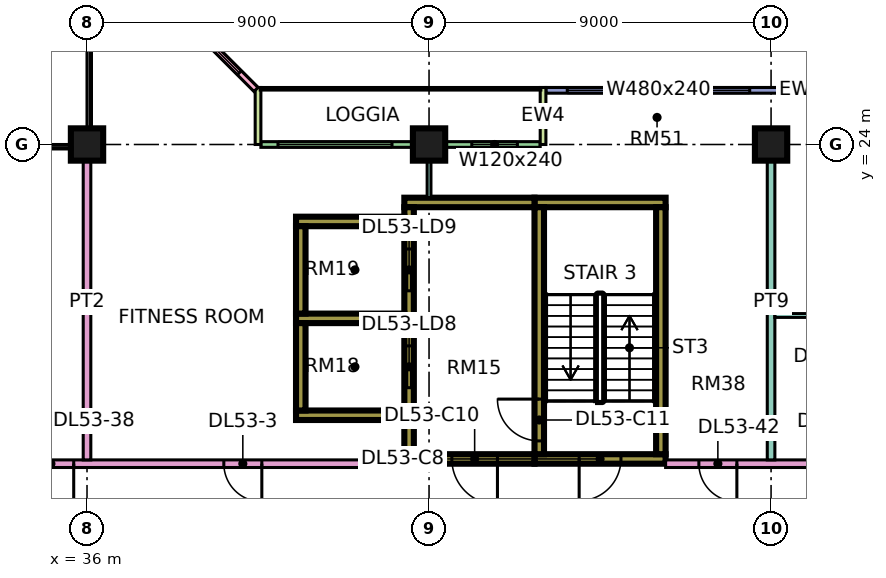
"""IFC4 building model, lengths in metres.
Left out: names, types, materials, properties, quantities, classifications, styles, units other than length and angle.
Written with IfcOpenShell. Run it as: python <this file> out.ifc"""

import sys

from ifc_helpers import new_model, si_unit, direction, frame, frame_2d, origin, origin_2d, place, context, subcontext, project, spatial, rectangle, extrude, element, fill, save


model = new_model("IFC4")
c1 = context("Model", 3, precision=1e-05, world=origin(), true_north=direction((0.0, 1.0)))
c2 = subcontext(c1, "Body", "Model", "MODEL_VIEW")
j1 = project(units=[si_unit("LENGTHUNIT", "METRE"), si_unit("PLANEANGLEUNIT", "RADIAN")], contexts=[c1])
p1 = place(None, origin())
s1 = spatial("IfcSite", under=j1, at=p1, CompositionType="ELEMENT")
p2 = place(p1, origin())
s2 = spatial("IfcBuilding", under=s1, at=p2, CompositionType="ELEMENT")
p3 = place(p2, frame((0.0, 0.0, 226.65)))
s3 = spatial("IfcBuildingStorey", under=s2, at=p3, CompositionType="ELEMENT", Elevation=226.65)
for number, where, z_axis, x_axis in (
    (1, (36.0, 24.0, 0.0), (0.0, 0.0, 1.0), (1.0, 0.0, 0.0)),
    (2, (45.0, 24.0, 0.0), (0.0, 0.0, 1.0), (1.0, 0.0, 0.0)),
    (3, (54.0, 24.0, 0.0), (0.0, 0.0, 1.0), (1.0, 0.0, 0.0)),
):
    element("IfcColumn", number, at=place(p3, frame(where, z_axis=z_axis, x_axis=x_axis)), inside=s3, PredefinedType="COLUMN", context=c2, shape_type="SweptSolid", body=[
        extrude(rectangle(XDim=0.85, YDim=0.85, at=origin_2d()), origin(), (0.0, 0.0, 1.0), 3.75),
    ])
p4 = place(p3, frame((47.775, 15.725, 0.0), z_axis=(0.0, 0.0, 1.0), x_axis=(1.0, 0.0, 0.0)))
e4 = element("IfcWall", 4, at=p4, inside=s3, PredefinedType="SHEAR", context=c2, shape_type="SweptSolid", body=[
    extrude(rectangle(XDim=3.45, YDim=0.25, at=frame_2d((1.725, 0.0))), origin(), (0.0, 0.0, 1.0), 3.75),
])
p5 = place(p4, frame((1.175, 0.0, 0.0)))
e5 = element("IfcOpeningElement", 5, at=p5, cuts=e4, PredefinedType="OPENING", context=c2, shape_type="SweptSolid", body=[
    extrude(rectangle(XDim=1.1, YDim=2.2, at=frame_2d((0.55, 1.1))), frame((0.0, 0.135, 0.0), z_axis=(0.0, -1.0, 0.0), x_axis=(1.0, 0.0, 0.0)), (0.0, 0.0, 1.0), 0.27),
])
p6 = place(p3, frame((47.775, 22.475, 0.0), z_axis=(0.0, 0.0, 1.0), x_axis=(1.0, 0.0, 0.0)))
e6 = element("IfcWall", 6, at=p6, inside=s3, PredefinedType="SHEAR", context=c2, shape_type="SweptSolid", body=[
    extrude(rectangle(XDim=3.45, YDim=0.25, at=frame_2d((1.725, 0.0))), origin(), (0.0, 0.0, 1.0), 3.75),
])
p7 = place(p3, frame((47.9, 15.85, 0.0), z_axis=(0.0, 0.0, 1.0), x_axis=(0.0, 1.0, 0.0)))
e7 = element("IfcWall", 7, at=p7, inside=s3, PredefinedType="SHEAR", context=c2, shape_type="SweptSolid", body=[
    extrude(rectangle(XDim=6.5, YDim=0.25, at=frame_2d((3.25, 0.0))), origin(), (0.0, 0.0, 1.0), 3.75),
])
p8 = place(p7, frame((0.35, 0.0, 0.0)))
e8 = element("IfcOpeningElement", 8, at=p8, cuts=e7, PredefinedType="OPENING", context=c2, shape_type="SweptSolid", body=[
    extrude(rectangle(XDim=1.1, YDim=2.2, at=frame_2d((0.55, 1.1))), frame((0.0, 0.135, 0.0), z_axis=(0.0, -1.0, 0.0), x_axis=(1.0, 0.0, 0.0)), (0.0, 0.0, 1.0), 0.27),
])
p9 = place(p3, frame((51.1, 15.85, 0.0), z_axis=(0.0, 0.0, 1.0), x_axis=(0.0, 1.0, 0.0)))
e9 = element("IfcWall", 9, at=p9, inside=s3, PredefinedType="SHEAR", context=c2, shape_type="SweptSolid", body=[
    extrude(rectangle(XDim=6.5, YDim=0.25, at=frame_2d((3.25, 0.0))), origin(), (0.0, 0.0, 1.0), 3.75),
])
p10 = place(p3, frame((44.35, 15.725, 0.0), z_axis=(0.0, 0.0, 1.0), x_axis=(1.0, 0.0, 0.0)))
e10 = element("IfcWall", 10, at=p10, inside=s3, PredefinedType="SHEAR", context=c2, shape_type="SweptSolid", body=[
    extrude(rectangle(XDim=3.425, YDim=0.25, at=frame_2d((1.712, 0.0))), origin(), (0.0, 0.0, 1.0), 3.75),
])
p11 = place(p10, frame((1.25, 0.0, 0.0)))
e11 = element("IfcOpeningElement", 11, at=p11, cuts=e10, PredefinedType="OPENING", context=c2, shape_type="SweptSolid", body=[
    extrude(rectangle(XDim=1.2, YDim=2.2, at=frame_2d((0.6, 1.1))), frame((0.0, 0.135, 0.0), z_axis=(0.0, -1.0, 0.0), x_axis=(1.0, 0.0, 0.0)), (0.0, 0.0, 1.0), 0.27),
])
p12 = place(p3, frame((44.35, 22.475, 0.0), z_axis=(0.0, 0.0, 1.0), x_axis=(1.0, 0.0, 0.0)))
e12 = element("IfcWall", 12, at=p12, inside=s3, PredefinedType="SHEAR", context=c2, shape_type="SweptSolid", body=[
    extrude(rectangle(XDim=3.425, YDim=0.25, at=frame_2d((1.712, 0.0))), origin(), (0.0, 0.0, 1.0), 3.75),
])
p13 = place(p3, frame((44.475, 15.85, 0.0), z_axis=(0.0, 0.0, 1.0), x_axis=(0.0, 1.0, 0.0)))
e13 = element("IfcWall", 13, at=p13, inside=s3, PredefinedType="SHEAR", context=c2, shape_type="SweptSolid", body=[
    extrude(rectangle(XDim=6.5, YDim=0.25, at=frame_2d((3.25, 0.0))), origin(), (0.0, 0.0, 1.0), 3.75),
])
p14 = place(p13, frame((1.75, 0.0, 0.0)))
e14 = element("IfcOpeningElement", 14, at=p14, cuts=e13, PredefinedType="OPENING", context=c2, shape_type="SweptSolid", body=[
    extrude(rectangle(XDim=1.1, YDim=2.2, at=frame_2d((0.55, 1.1))), frame((0.0, 0.135, 0.0), z_axis=(0.0, -1.0, 0.0), x_axis=(1.0, 0.0, 0.0)), (0.0, 0.0, 1.0), 0.27),
])
p15 = place(p13, frame((4.3, 0.0, 0.0)))
e15 = element("IfcOpeningElement", 15, at=p15, cuts=e13, PredefinedType="OPENING", context=c2, shape_type="SweptSolid", body=[
    extrude(rectangle(XDim=1.1, YDim=2.2, at=frame_2d((0.55, 1.1))), frame((0.0, 0.135, 0.0), z_axis=(0.0, -1.0, 0.0), x_axis=(1.0, 0.0, 0.0)), (0.0, 0.0, 1.0), 0.27),
])
for number, where, z_axis, x_axis in (
    (16, (41.5, 16.875, 0.0), (0.0, 0.0, 1.0), (1.0, 0.0, 0.0)),
    (17, (41.5, 19.425, 0.0), (0.0, 0.0, 1.0), (1.0, 0.0, 0.0)),
    (18, (41.5, 21.975, 0.0), (0.0, 0.0, 1.0), (1.0, 0.0, 0.0)),
):
    element("IfcWall", number, at=place(p3, frame(where, z_axis=z_axis, x_axis=x_axis)), inside=s3, PredefinedType="SHEAR", context=c2, shape_type="SweptSolid", body=[
        extrude(rectangle(XDim=2.85, YDim=0.25, at=frame_2d((1.425, 0.0))), origin(), (0.0, 0.0, 1.0), 3.75),
    ])
for number, where, z_axis, x_axis in (
    (19, (41.625, 17.0, 0.0), (0.0, 0.0, 1.0), (0.0, 1.0, 0.0)),
    (20, (41.625, 19.55, 0.0), (0.0, 0.0, 1.0), (0.0, 1.0, 0.0)),
):
    element("IfcWall", number, at=place(p3, frame(where, z_axis=z_axis, x_axis=x_axis)), inside=s3, PredefinedType="SHEAR", context=c2, shape_type="SweptSolid", body=[
        extrude(rectangle(XDim=2.3, YDim=0.25, at=frame_2d((1.15, 0.0))), origin(), (0.0, 0.0, 1.0), 3.75),
    ])
p16 = place(p3, frame((61.5, 25.425, 0.0), z_axis=(0.0, 0.0, 1.0), x_axis=(-1.0, 0.0, 0.0)))
e21 = element("IfcWall", 21, at=p16, inside=s3, PredefinedType="SOLIDWALL", context=c2, shape_type="SweptSolid", body=[
    extrude(rectangle(XDim=13.425, YDim=0.15, at=frame_2d((6.712, 0.0))), origin(), (0.0, 0.0, 1.0), 3.35),
])
p17 = place(p16, frame((2.1, 0.0, 0.45)))
e22 = element("IfcOpeningElement", 22, at=p17, cuts=e21, PredefinedType="OPENING", context=c2, shape_type="SweptSolid", body=[
    extrude(rectangle(XDim=1.8, YDim=2.4, at=frame_2d((0.9, 1.2))), frame((0.0, 0.085, 0.0), z_axis=(0.0, -1.0, 0.0), x_axis=(1.0, 0.0, 0.0)), (0.0, 0.0, 1.0), 0.17),
])
p18 = place(p16, frame((5.1, 0.0, 0.45)))
e23 = element("IfcOpeningElement", 23, at=p18, cuts=e21, PredefinedType="OPENING", context=c2, shape_type="SweptSolid", body=[
    extrude(rectangle(XDim=1.8, YDim=2.4, at=frame_2d((0.9, 1.2))), frame((0.0, 0.085, 0.0), z_axis=(0.0, -1.0, 0.0), x_axis=(1.0, 0.0, 0.0)), (0.0, 0.0, 1.0), 0.17),
])
p19 = place(p16, frame((8.062, 0.0, 0.45)))
e24 = element("IfcOpeningElement", 24, at=p19, cuts=e21, PredefinedType="OPENING", context=c2, shape_type="SweptSolid", body=[
    extrude(rectangle(XDim=4.8, YDim=2.4, at=frame_2d((2.4, 1.2))), frame((0.0, 0.085, 0.0), z_axis=(0.0, -1.0, 0.0), x_axis=(1.0, 0.0, 0.0)), (0.0, 0.0, 1.0), 0.17),
])
p20 = place(p3, frame((47.925, 24.0, 0.0), z_axis=(0.0, 0.0, 1.0), x_axis=(-1.0, 0.0, 0.0)))
e25 = element("IfcWall", 25, at=p20, inside=s3, PredefinedType="SOLIDWALL", context=c2, shape_type="SweptSolid", body=[
    extrude(rectangle(XDim=7.35, YDim=0.15, at=frame_2d((3.675, 0.0))), origin(), (0.0, 0.0, 1.0), 3.35),
])
p21 = place(p20, frame((0.6, 0.0, 0.45)))
e26 = element("IfcOpeningElement", 26, at=p21, cuts=e25, PredefinedType="OPENING", context=c2, shape_type="SweptSolid", body=[
    extrude(rectangle(XDim=1.2, YDim=2.4, at=frame_2d((0.6, 1.2))), frame((0.0, 0.085, 0.0), z_axis=(0.0, -1.0, 0.0), x_axis=(1.0, 0.0, 0.0)), (0.0, 0.0, 1.0), 0.17),
])
p22 = place(p20, frame((3.9, 0.0, 0.45)))
e27 = element("IfcOpeningElement", 27, at=p22, cuts=e25, PredefinedType="OPENING", context=c2, shape_type="SweptSolid", body=[
    extrude(rectangle(XDim=3.0, YDim=2.4, at=frame_2d((1.5, 1.2))), frame((0.0, 0.085, 0.0), z_axis=(0.0, -1.0, 0.0), x_axis=(1.0, 0.0, 0.0)), (0.0, 0.0, 1.0), 0.17),
])
for number, where, z_axis, x_axis in (
    (28, (48.0, 25.5, 0.0), (0.0, 0.0, 1.0), (0.0, -1.0, 0.0)),
    (29, (40.5, 25.5, 0.0), (0.0, 0.0, 1.0), (0.0, -1.0, 0.0)),
):
    element("IfcWall", number, at=place(p3, frame(where, z_axis=z_axis, x_axis=x_axis)), inside=s3, PredefinedType="SOLIDWALL", context=c2, shape_type="SweptSolid", body=[
        extrude(rectangle(XDim=1.5, YDim=0.15, at=frame_2d((0.75, 0.0))), origin(), (0.0, 0.0, 1.0), 3.35),
    ])
p23 = place(p3, frame((40.447, 25.447, 0.0), z_axis=(0.0, 0.0, 1.0), x_axis=(-0.707106781187, 0.707106781187, 0.0)))
e30 = element("IfcWall", 30, at=p23, inside=s3, PredefinedType="SOLIDWALL", context=c2, shape_type="SweptSolid", body=[
    extrude(rectangle(XDim=4.243, YDim=0.15, at=frame_2d((2.121, 0.0))), origin(), (0.0, 0.0, 1.0), 3.35),
])
p24 = place(p23, frame((0.621, 0.0, 0.45)))
e31 = element("IfcOpeningElement", 31, at=p24, cuts=e30, PredefinedType="OPENING", context=c2, shape_type="SweptSolid", body=[
    extrude(rectangle(XDim=3.0, YDim=2.4, at=frame_2d((1.5, 1.2))), frame((0.0, 0.085, 0.0), z_axis=(0.0, -1.0, 0.0), x_axis=(1.0, 0.0, 0.0)), (0.0, 0.0, 1.0), 0.17),
])
p25 = place(p3, frame((34.0, 15.6, 0.0), z_axis=(0.0, 0.0, 1.0), x_axis=(1.0, 0.0, 0.0)))
e32 = element("IfcWall", 32, at=p25, inside=s3, PredefinedType="PARTITIONING", context=c2, shape_type="SweptSolid", body=[
    extrude(rectangle(XDim=10.35, YDim=0.2, at=frame_2d((5.175, 0.0))), origin(), (0.0, 0.0, 1.0), 3.35),
])
p26 = place(p25, frame((5.6, 0.0, 0.0)))
e33 = element("IfcOpeningElement", 33, at=p26, cuts=e32, PredefinedType="OPENING", context=c2, shape_type="SweptSolid", body=[
    extrude(rectangle(XDim=1.0, YDim=2.1, at=frame_2d((0.5, 1.05))), frame((0.0, 0.11, 0.0), z_axis=(0.0, -1.0, 0.0), x_axis=(1.0, 0.0, 0.0)), (0.0, 0.0, 1.0), 0.22),
])
p27 = place(p25, frame((0.45, 0.0, 0.0)))
e34 = element("IfcOpeningElement", 34, at=p27, cuts=e32, PredefinedType="OPENING", context=c2, shape_type="SweptSolid", body=[
    extrude(rectangle(XDim=1.2, YDim=2.1, at=frame_2d((0.6, 1.05))), frame((0.0, 0.11, 0.0), z_axis=(0.0, -1.0, 0.0), x_axis=(1.0, 0.0, 0.0)), (0.0, 0.0, 1.0), 0.22),
])
p28 = place(p3, frame((36.0, 15.7, 0.0), z_axis=(0.0, 0.0, 1.0), x_axis=(0.0, 1.0, 0.0)))
e35 = element("IfcWall", 35, at=p28, inside=s3, PredefinedType="PARTITIONING", context=c2, shape_type="SweptSolid", body=[
    extrude(rectangle(XDim=8.3, YDim=0.2, at=frame_2d((4.15, 0.0))), origin(), (0.0, 0.0, 1.0), 3.35),
])
p29 = place(p3, frame((45.0, 22.6, 0.0), z_axis=(0.0, 0.0, 1.0), x_axis=(0.0, 1.0, 0.0)))
e36 = element("IfcWall", 36, at=p29, inside=s3, PredefinedType="PARTITIONING", context=c2, shape_type="SweptSolid", body=[
    extrude(rectangle(XDim=1.326, YDim=0.1, at=frame_2d((0.663, 0.0))), origin(), (0.0, 0.0, 1.0), 3.35),
])
p30 = place(p3, frame((51.225, 15.6, 0.0), z_axis=(0.0, 0.0, 1.0), x_axis=(1.0, 0.0, 0.0)))
e37 = element("IfcWall", 37, at=p30, inside=s3, PredefinedType="PARTITIONING", context=c2, shape_type="SweptSolid", body=[
    extrude(rectangle(XDim=11.701, YDim=0.2, at=frame_2d((5.851, 0.0))), origin(), (0.0, 0.0, 1.0), 3.35),
])
p31 = place(p30, frame((3.875, 0.0, 0.0)))
e38 = element("IfcOpeningElement", 38, at=p31, cuts=e37, PredefinedType="OPENING", context=c2, shape_type="SweptSolid", body=[
    extrude(rectangle(XDim=1.0, YDim=2.1, at=frame_2d((0.5, 1.05))), frame((0.0, 0.11, 0.0), z_axis=(0.0, -1.0, 0.0), x_axis=(1.0, 0.0, 0.0)), (0.0, 0.0, 1.0), 0.22),
])
p32 = place(p30, frame((0.875, 0.0, 0.0)))
e39 = element("IfcOpeningElement", 39, at=p32, cuts=e37, PredefinedType="OPENING", context=c2, shape_type="SweptSolid", body=[
    extrude(rectangle(XDim=1.0, YDim=2.1, at=frame_2d((0.5, 1.05))), frame((0.0, 0.11, 0.0), z_axis=(0.0, -1.0, 0.0), x_axis=(1.0, 0.0, 0.0)), (0.0, 0.0, 1.0), 0.22),
])
p33 = place(p3, frame((54.0, 15.7, 0.0), z_axis=(0.0, 0.0, 1.0), x_axis=(0.0, 1.0, 0.0)))
e40 = element("IfcWall", 40, at=p33, inside=s3, PredefinedType="PARTITIONING", context=c2, shape_type="SweptSolid", body=[
    extrude(rectangle(XDim=8.3, YDim=0.2, at=frame_2d((4.15, 0.0))), origin(), (0.0, 0.0, 1.0), 3.35),
])
p34 = place(p3, frame((54.1, 19.5, 0.0), z_axis=(0.0, 0.0, 1.0), x_axis=(1.0, 0.0, 0.0)))
e41 = element("IfcWall", 41, at=p34, inside=s3, PredefinedType="PARTITIONING", context=c2, shape_type="SweptSolid", body=[
    extrude(rectangle(XDim=5.95, YDim=0.1, at=frame_2d((2.975, 0.0))), origin(), (0.0, 0.0, 1.0), 3.35),
])
p35 = place(p34, frame((0.95, 0.0, 0.0)))
e42 = element("IfcOpeningElement", 42, at=p35, cuts=e41, PredefinedType="OPENING", context=c2, shape_type="SweptSolid", body=[
    extrude(rectangle(XDim=0.9, YDim=2.1, at=frame_2d((0.45, 1.05))), frame((0.0, 0.06, 0.0), z_axis=(0.0, -1.0, 0.0), x_axis=(1.0, 0.0, 0.0)), (0.0, 0.0, 1.0), 0.12),
])
p36 = place(p34, frame((3.95, 0.0, 0.0)))
e43 = element("IfcOpeningElement", 43, at=p36, cuts=e41, PredefinedType="OPENING", context=c2, shape_type="SweptSolid", body=[
    extrude(rectangle(XDim=0.9, YDim=2.1, at=frame_2d((0.45, 1.05))), frame((0.0, 0.06, 0.0), z_axis=(0.0, -1.0, 0.0), x_axis=(1.0, 0.0, 0.0)), (0.0, 0.0, 1.0), 0.12),
])
p37 = place(p18, origin())
e44 = element("IfcWindow", 44, at=p37, inside=s3, PartitioningType="SINGLE_PANEL", PredefinedType="WINDOW", context=c2, shape_type="SweptSolid", body=[
    extrude(rectangle(XDim=1.8, YDim=2.4, at=frame_2d((0.9, 1.2))), frame((0.0, 0.03, 0.0), z_axis=(0.0, -1.0, 0.0), x_axis=(1.0, 0.0, 0.0)), (0.0, 0.0, 1.0), 0.06),
])
fill(e23, e44)
p38 = place(p19, origin())
e45 = element("IfcWindow", 45, at=p38, inside=s3, PartitioningType="SINGLE_PANEL", PredefinedType="WINDOW", context=c2, shape_type="SweptSolid", body=[
    extrude(rectangle(XDim=4.8, YDim=2.4, at=frame_2d((2.4, 1.2))), frame((0.0, 0.03, 0.0), z_axis=(0.0, -1.0, 0.0), x_axis=(1.0, 0.0, 0.0)), (0.0, 0.0, 1.0), 0.06),
])
fill(e24, e45)
p39 = place(p21, origin())
e46 = element("IfcWindow", 46, at=p39, inside=s3, PartitioningType="SINGLE_PANEL", PredefinedType="WINDOW", context=c2, shape_type="SweptSolid", body=[
    extrude(rectangle(XDim=1.2, YDim=2.4, at=frame_2d((0.6, 1.2))), frame((0.0, 0.03, 0.0), z_axis=(0.0, -1.0, 0.0), x_axis=(1.0, 0.0, 0.0)), (0.0, 0.0, 1.0), 0.06),
])
fill(e26, e46)
p40 = place(p22, origin())
e47 = element("IfcWindow", 47, at=p40, inside=s3, PartitioningType="SINGLE_PANEL", PredefinedType="WINDOW", context=c2, shape_type="SweptSolid", body=[
    extrude(rectangle(XDim=3.0, YDim=2.4, at=frame_2d((1.5, 1.2))), frame((0.0, 0.03, 0.0), z_axis=(0.0, -1.0, 0.0), x_axis=(1.0, 0.0, 0.0)), (0.0, 0.0, 1.0), 0.06),
])
fill(e27, e47)
p41 = place(p24, origin())
e48 = element("IfcWindow", 48, at=p41, inside=s3, PartitioningType="SINGLE_PANEL", PredefinedType="WINDOW", context=c2, shape_type="SweptSolid", body=[
    extrude(rectangle(XDim=3.0, YDim=2.4, at=frame_2d((1.5, 1.2))), frame((0.0, 0.03, 0.0), z_axis=(0.0, -1.0, 0.0), x_axis=(1.0, 0.0, 0.0)), (0.0, 0.0, 1.0), 0.06),
])
fill(e31, e48)
p42 = place(p5, frame((1.1, 0.0, 0.0), z_axis=(0.0, 0.0, 1.0), x_axis=(-1.0, 0.0, 0.0)))
e49 = element("IfcDoor", 49, at=p42, inside=s3, OperationType="SINGLE_SWING_LEFT", PredefinedType="DOOR", context=c2, shape_type="SweptSolid", body=[
    extrude(rectangle(XDim=1.1, YDim=2.2, at=frame_2d((0.55, 1.1))), frame((0.0, 0.025, 0.0), z_axis=(0.0, -1.0, 0.0), x_axis=(1.0, 0.0, 0.0)), (0.0, 0.0, 1.0), 0.05),
])
fill(e5, e49)
p43 = place(p11, origin())
e50 = element("IfcDoor", 50, at=p43, inside=s3, OperationType="SINGLE_SWING_RIGHT", PredefinedType="DOOR", context=c2, shape_type="SweptSolid", body=[
    extrude(rectangle(XDim=1.2, YDim=2.2, at=frame_2d((0.6, 1.1))), frame((0.0, 0.025, 0.0), z_axis=(0.0, -1.0, 0.0), x_axis=(1.0, 0.0, 0.0)), (0.0, 0.0, 1.0), 0.05),
])
fill(e11, e50)
p44 = place(p8, frame((1.1, 0.0, 0.0), z_axis=(0.0, 0.0, 1.0), x_axis=(-1.0, 0.0, 0.0)))
e51 = element("IfcDoor", 51, at=p44, inside=s3, OperationType="SINGLE_SWING_RIGHT", PredefinedType="DOOR", context=c2, shape_type="SweptSolid", body=[
    extrude(rectangle(XDim=1.1, YDim=2.2, at=frame_2d((0.55, 1.1))), frame((0.0, 0.025, 0.0), z_axis=(0.0, -1.0, 0.0), x_axis=(1.0, 0.0, 0.0)), (0.0, 0.0, 1.0), 0.05),
])
fill(e8, e51)
p45 = place(p14, origin())
e52 = element("IfcDoor", 52, at=p45, inside=s3, OperationType="DOUBLE_DOOR_SLIDING", PredefinedType="DOOR", context=c2, shape_type="SweptSolid", body=[
    extrude(rectangle(XDim=1.1, YDim=2.2, at=frame_2d((0.55, 1.1))), frame((0.0, 0.025, 0.0), z_axis=(0.0, -1.0, 0.0), x_axis=(1.0, 0.0, 0.0)), (0.0, 0.0, 1.0), 0.05),
])
fill(e14, e52)
p46 = place(p15, origin())
e53 = element("IfcDoor", 53, at=p46, inside=s3, OperationType="DOUBLE_DOOR_SLIDING", PredefinedType="DOOR", context=c2, shape_type="SweptSolid", body=[
    extrude(rectangle(XDim=1.1, YDim=2.2, at=frame_2d((0.55, 1.1))), frame((0.0, 0.025, 0.0), z_axis=(0.0, -1.0, 0.0), x_axis=(1.0, 0.0, 0.0)), (0.0, 0.0, 1.0), 0.05),
])
fill(e15, e53)
p47 = place(p26, origin())
e54 = element("IfcDoor", 54, at=p47, inside=s3, OperationType="SINGLE_SWING_RIGHT", PredefinedType="DOOR", context=c2, shape_type="SweptSolid", body=[
    extrude(rectangle(XDim=1.0, YDim=2.1, at=frame_2d((0.5, 1.05))), frame((0.0, 0.025, 0.0), z_axis=(0.0, -1.0, 0.0), x_axis=(1.0, 0.0, 0.0)), (0.0, 0.0, 1.0), 0.05),
])
fill(e33, e54)
p48 = place(p27, origin())
e55 = element("IfcDoor", 55, at=p48, inside=s3, OperationType="SINGLE_SWING_RIGHT", PredefinedType="DOOR", context=c2, shape_type="SweptSolid", body=[
    extrude(rectangle(XDim=1.2, YDim=2.1, at=frame_2d((0.6, 1.05))), frame((0.0, 0.025, 0.0), z_axis=(0.0, -1.0, 0.0), x_axis=(1.0, 0.0, 0.0)), (0.0, 0.0, 1.0), 0.05),
])
fill(e34, e55)
p49 = place(p32, origin())
e56 = element("IfcDoor", 56, at=p49, inside=s3, OperationType="SINGLE_SWING_RIGHT", PredefinedType="DOOR", context=c2, shape_type="SweptSolid", body=[
    extrude(rectangle(XDim=1.0, YDim=2.1, at=frame_2d((0.5, 1.05))), frame((0.0, 0.025, 0.0), z_axis=(0.0, -1.0, 0.0), x_axis=(1.0, 0.0, 0.0)), (0.0, 0.0, 1.0), 0.05),
])
fill(e39, e56)
save(model, sys.argv[1])
